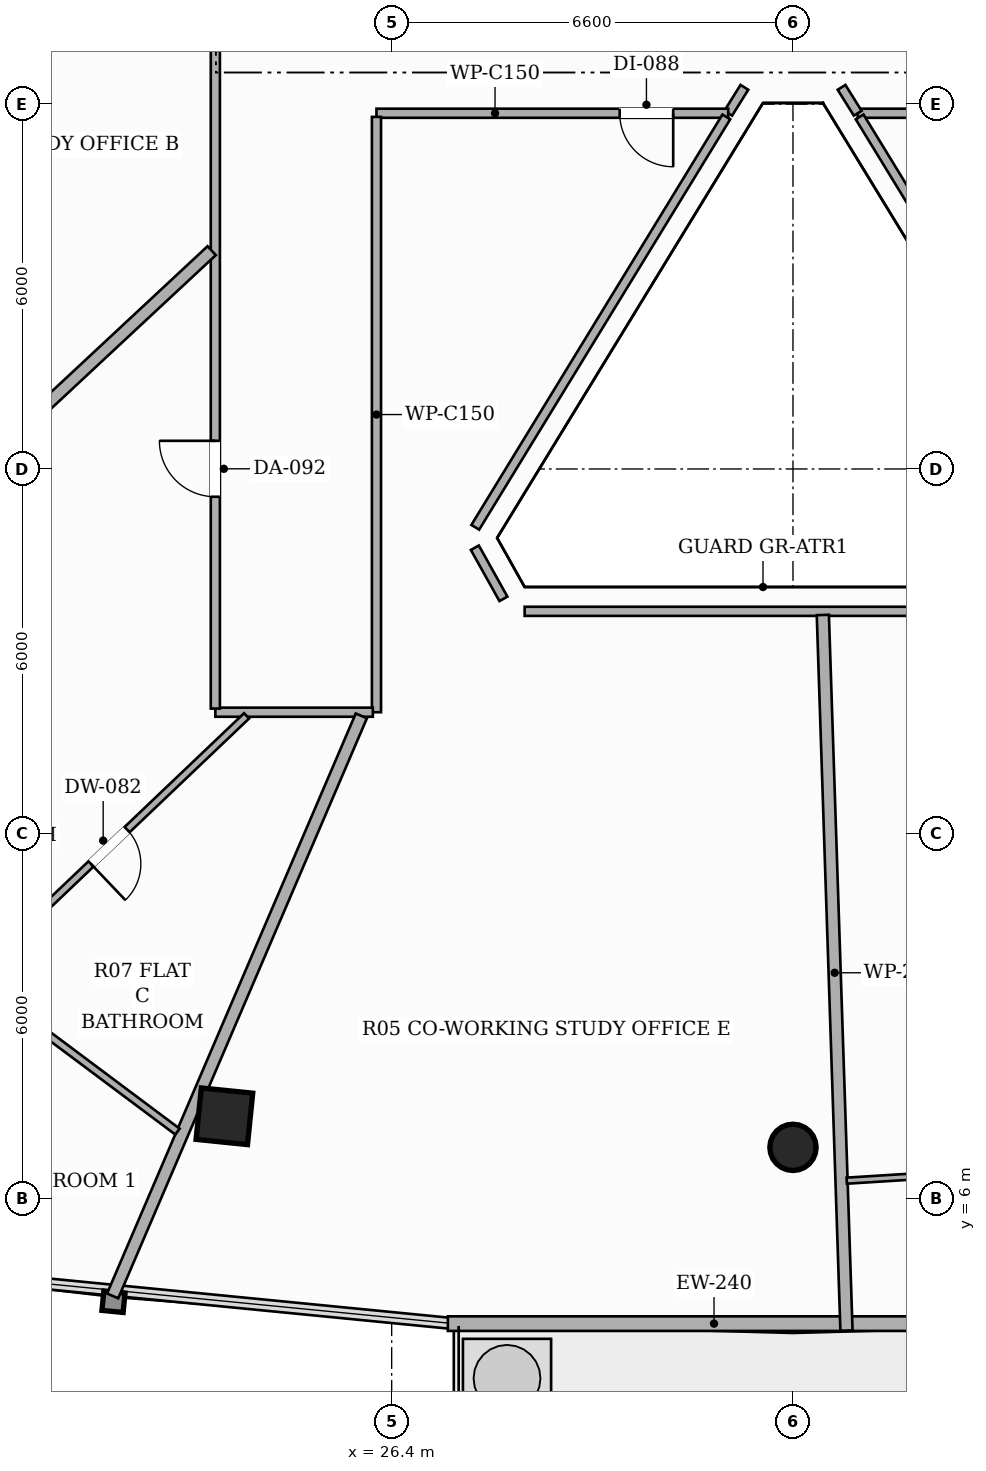
"""IFC4 building model, lengths in metres.
Left out: names, types, materials, properties, quantities, classifications, styles, units other than length and angle.
Written with IfcOpenShell. Run it as: python <this file> out.ifc"""

import sys

from ifc_helpers import new_model, si_unit, direction, frame, frame_2d, origin, origin_2d, place, context, subcontext, project, spatial, rectangle, hollow_rectangle, hollow_circle, extrude, element, fill, save


model = new_model("IFC4")
c1 = context("Model", 3, precision=1e-05, world=origin(), true_north=direction((0.0, 1.0)))
c2 = subcontext(c1, "Body", "Model", "MODEL_VIEW")
j1 = project(units=[si_unit("LENGTHUNIT", "METRE"), si_unit("PLANEANGLEUNIT", "RADIAN")], contexts=[c1])
p1 = place(None, origin())
s1 = spatial("IfcSite", under=j1, at=p1, CompositionType="ELEMENT")
p2 = place(p1, origin())
s2 = spatial("IfcBuilding", under=s1, at=p2, CompositionType="ELEMENT")
p3 = place(p2, frame((0.0, 0.0, 173.75)))
s3 = spatial("IfcBuildingStorey", under=s2, at=p3, CompositionType="ELEMENT", Elevation=173.75)
p4 = place(p3, frame((23.649, 7.355, 0.0), z_axis=(0.0, 0.0, 1.0), x_axis=(-0.994880708829, 0.101056297183, 0.0)))
e1 = element("IfcColumn", 1, at=p4, inside=s3, PredefinedType="COLUMN", context=c2, shape_type="SweptSolid", body=[
    extrude(hollow_rectangle(XDim=0.85, YDim=0.85, WallThickness=0.028, at=origin_2d()), origin(), (0.0, 0.0, 1.0), 3.3),
])
p5 = place(p3, frame((33.0, 6.844, 0.0), z_axis=(0.0, 0.0, 1.0), x_axis=(1.0, 0.0, 0.0)))
e2 = element("IfcColumn", 2, at=p5, inside=s3, PredefinedType="COLUMN", context=c2, shape_type="SweptSolid", body=[
    extrude(hollow_circle(Radius=0.381, WallThickness=0.022, at=origin_2d()), origin(), (0.0, 0.0, 1.0), 3.3),
])
p6 = place(p3, frame((20.826, 33.811, 0.0), z_axis=(0.0, 0.0, 1.0), x_axis=(-0.514332213488, -0.857591029669, 0.0)))
e3 = element("IfcWall", 3, at=p6, inside=s3, PredefinedType="SOLIDWALL", context=c2, shape_type="SweptSolid", body=[
    extrude(rectangle(XDim=10.977, YDim=0.24, at=frame_2d((5.489, 0.0))), origin(), (0.0, 0.0, 1.0), 2.624),
])
p7 = place(p6, frame((8.48, 0.0, 0.0)))
e4 = element("IfcOpeningElement", 4, at=p7, cuts=e3, PredefinedType="OPENING", context=c2, shape_type="SweptSolid", body=[
    extrude(rectangle(XDim=1.8, YDim=2.2, at=frame_2d((0.9, 1.1))), frame((0.0, 0.13, 0.0), z_axis=(0.0, -1.0, 0.0), x_axis=(1.0, 0.0, 0.0)), (0.0, 0.0, 1.0), 0.26),
])
p8 = place(p3, frame((27.324, 3.945, 0.0), z_axis=(0.0, 0.0, 1.0), x_axis=(1.0, 0.0, 0.0)))
e5 = element("IfcWall", 5, at=p8, inside=s3, PredefinedType="SOLIDWALL", context=c2, shape_type="SweptSolid", body=[
    extrude(rectangle(XDim=11.352, YDim=0.24, at=frame_2d((5.676, 0.0))), origin(), (0.0, 0.0, 1.0), 2.624),
])
p9 = place(p8, frame((8.855, 0.0, 0.0)))
e6 = element("IfcOpeningElement", 6, at=p9, cuts=e5, PredefinedType="OPENING", context=c2, shape_type="SweptSolid", body=[
    extrude(rectangle(XDim=1.8, YDim=2.2, at=frame_2d((0.9, 1.1))), frame((0.0, 0.13, 0.0), z_axis=(0.0, -1.0, 0.0), x_axis=(1.0, 0.0, 0.0)), (0.0, 0.0, 1.0), 0.26),
])
p10 = place(p3, frame((32.201, 24.276, 0.0), z_axis=(0.0, 0.0, 1.0), x_axis=(-0.529649150849, -0.84821682193, 0.0)))
e7 = element("IfcWall", 7, at=p10, inside=s3, PredefinedType="PARTITIONING", context=c2, shape_type="SweptSolid", body=[
    extrude(rectangle(XDim=0.502, YDim=0.15, at=frame_2d((0.251, 0.0))), origin(), (0.0, 0.0, 1.0), 3.06),
])
p11 = place(p3, frame((31.935, 23.85, 0.0), z_axis=(0.0, 0.0, 1.0), x_axis=(-1.0, 0.0, 0.0)))
e8 = element("IfcWall", 8, at=p11, inside=s3, PredefinedType="PARTITIONING", context=c2, shape_type="SweptSolid", body=[
    extrude(rectangle(XDim=5.785, YDim=0.15, at=frame_2d((2.893, 0.0))), origin(), (0.0, 0.0, 1.0), 2.721),
])
p12 = place(p11, frame((0.905, 0.0, 0.0)))
e9 = element("IfcOpeningElement", 9, at=p12, cuts=e8, PredefinedType="OPENING", context=c2, shape_type="SweptSolid", body=[
    extrude(rectangle(XDim=0.88, YDim=2.1, at=frame_2d((0.44, 1.05))), frame((0.0, 0.085, 0.0), z_axis=(0.0, -1.0, 0.0), x_axis=(1.0, 0.0, 0.0)), (0.0, 0.0, 1.0), 0.17),
])
p13 = place(p3, frame((26.15, 23.79, 0.0), z_axis=(0.0, 0.0, 1.0), x_axis=(0.0, -1.0, 0.0)))
e10 = element("IfcWall", 10, at=p13, inside=s3, PredefinedType="PARTITIONING", context=c2, shape_type="SweptSolid", body=[
    extrude(rectangle(XDim=9.79, YDim=0.15, at=frame_2d((4.895, 0.0))), origin(), (0.0, 0.0, 1.0), 2.721),
])
p14 = place(p3, frame((26.09, 14.0, 0.0), z_axis=(0.0, 0.0, 1.0), x_axis=(-1.0, 0.0, 0.0)))
e11 = element("IfcWall", 11, at=p14, inside=s3, PredefinedType="PARTITIONING", context=c2, shape_type="SweptSolid", body=[
    extrude(rectangle(XDim=2.59, YDim=0.15, at=frame_2d((1.295, 0.0))), origin(), (0.0, 0.0, 1.0), 2.721),
])
p15 = place(p3, frame((23.5, 14.06, 0.0), z_axis=(0.0, 0.0, 1.0), x_axis=(0.0, 1.0, 0.0)))
e12 = element("IfcWall", 12, at=p15, inside=s3, PredefinedType="PARTITIONING", context=c2, shape_type="SweptSolid", body=[
    extrude(rectangle(XDim=23.457, YDim=0.15, at=frame_2d((11.729, 0.0))), origin(), (0.0, 0.0, 1.0), 2.413),
])
p16 = place(p15, frame((14.586, 0.0, 0.0)))
e13 = element("IfcOpeningElement", 13, at=p16, cuts=e12, PredefinedType="OPENING", context=c2, shape_type="SweptSolid", body=[
    extrude(rectangle(XDim=0.88, YDim=2.1, at=frame_2d((0.44, 1.05))), frame((0.0, 0.085, 0.0), z_axis=(0.0, -1.0, 0.0), x_axis=(1.0, 0.0, 0.0)), (0.0, 0.0, 1.0), 0.17),
])
p17 = place(p15, frame((3.483, 0.0, 0.0)))
e14 = element("IfcOpeningElement", 14, at=p17, cuts=e12, PredefinedType="OPENING", context=c2, shape_type="SweptSolid", body=[
    extrude(rectangle(XDim=0.92, YDim=2.15, at=frame_2d((0.46, 1.075))), frame((0.0, 0.085, 0.0), z_axis=(0.0, -1.0, 0.0), x_axis=(1.0, 0.0, 0.0)), (0.0, 0.0, 1.0), 0.17),
])
p18 = place(p3, frame((42.29, 23.85, 0.0), z_axis=(0.0, 0.0, 1.0), x_axis=(-1.0, 0.0, 0.0)))
e15 = element("IfcWall", 15, at=p18, inside=s3, PredefinedType="PARTITIONING", context=c2, shape_type="SweptSolid", body=[
    extrude(rectangle(XDim=8.225, YDim=0.15, at=frame_2d((4.113, 0.0))), origin(), (0.0, 0.0, 1.0), 2.492),
])
p19 = place(p18, frame((5.493, 0.0, 0.0)))
e16 = element("IfcOpeningElement", 16, at=p19, cuts=e15, PredefinedType="OPENING", context=c2, shape_type="SweptSolid", body=[
    extrude(rectangle(XDim=0.92, YDim=2.15, at=frame_2d((0.46, 1.075))), frame((0.0, 0.085, 0.0), z_axis=(0.0, -1.0, 0.0), x_axis=(1.0, 0.0, 0.0)), (0.0, 0.0, 1.0), 0.17),
])
p20 = place(p18, frame((2.43, 0.0, 0.0)))
e17 = element("IfcOpeningElement", 17, at=p20, cuts=e15, PredefinedType="OPENING", context=c2, shape_type="SweptSolid", body=[
    extrude(rectangle(XDim=0.82, YDim=2.1, at=frame_2d((0.41, 1.05))), frame((0.0, 0.085, 0.0), z_axis=(0.0, -1.0, 0.0), x_axis=(1.0, 0.0, 0.0)), (0.0, 0.0, 1.0), 0.17),
])
p21 = place(p18, frame((0.14, 0.0, 0.0)))
e18 = element("IfcOpeningElement", 18, at=p21, cuts=e15, PredefinedType="OPENING", context=c2, shape_type="SweptSolid", body=[
    extrude(rectangle(XDim=0.88, YDim=2.1, at=frame_2d((0.44, 1.05))), frame((0.0, 0.085, 0.0), z_axis=(0.0, -1.0, 0.0), x_axis=(1.0, 0.0, 0.0)), (0.0, 0.0, 1.0), 0.17),
])
p22 = place(p3, frame((34.065, 23.85, 0.0), z_axis=(0.0, 0.0, 1.0), x_axis=(-0.529649150849, 0.84821682193, 0.0)))
e19 = element("IfcWall", 19, at=p22, inside=s3, PredefinedType="PARTITIONING", context=c2, shape_type="SweptSolid", body=[
    extrude(rectangle(XDim=0.502, YDim=0.15, at=frame_2d((0.251, 0.0))), origin(), (0.0, 0.0, 1.0), 3.06),
])
p23 = place(p3, frame((34.096, 23.79, 0.0), z_axis=(0.0, 0.0, 1.0), x_axis=(0.521886794995, -0.853014755564, 0.0)))
e20 = element("IfcWall", 20, at=p23, inside=s3, PredefinedType="PARTITIONING", context=c2, shape_type="SweptSolid", body=[
    extrude(rectangle(XDim=7.912, YDim=0.15, at=frame_2d((3.956, 0.0))), origin(), (0.0, 0.0, 1.0), 2.721),
])
p24 = place(p3, frame((37.413, 15.659, 0.0), z_axis=(0.0, 0.0, 1.0), x_axis=(-1.0, 0.0, 0.0)))
e21 = element("IfcWall", 21, at=p24, inside=s3, PredefinedType="PARTITIONING", context=c2, shape_type="SweptSolid", body=[
    extrude(rectangle(XDim=8.826, YDim=0.15, at=frame_2d((4.413, 0.0))), origin(), (0.0, 0.0, 1.0), 2.721),
])
p25 = place(p3, frame((28.238, 15.864, 0.0), z_axis=(0.0, 0.0, 1.0), x_axis=(-0.48779296069, 0.872959350429, 0.0)))
e22 = element("IfcWall", 22, at=p25, inside=s3, PredefinedType="PARTITIONING", context=c2, shape_type="SweptSolid", body=[
    extrude(rectangle(XDim=0.963, YDim=0.15, at=frame_2d((0.482, 0.0))), origin(), (0.0, 0.0, 1.0), 3.06),
])
p26 = place(p3, frame((27.775, 17.041, 0.0), z_axis=(0.0, 0.0, 1.0), x_axis=(0.521886794995, 0.853014755564, 0.0)))
e23 = element("IfcWall", 23, at=p26, inside=s3, PredefinedType="PARTITIONING", context=c2, shape_type="SweptSolid", body=[
    extrude(rectangle(XDim=7.912, YDim=0.15, at=frame_2d((3.956, 0.0))), origin(), (0.0, 0.0, 1.0), 2.721),
])
p27 = place(p3, frame((33.88, 3.831, 0.0), z_axis=(0.0, 0.0, 1.0), x_axis=(-0.033030388285, 0.999454347857, 0.0)))
e24 = element("IfcWall", 24, at=p27, inside=s3, PredefinedType="PARTITIONING", context=c2, shape_type="SweptSolid", body=[
    extrude(rectangle(XDim=11.774, YDim=0.2, at=frame_2d((5.887, 0.0))), origin(), (0.0, 0.0, 1.0), 2.413),
])
p28 = place(p3, frame((23.44, 21.59, 0.0), z_axis=(0.0, 0.0, 1.0), x_axis=(-0.731574776166, -0.681761209572, 0.0)))
e25 = element("IfcWall", 25, at=p28, inside=s3, PredefinedType="PARTITIONING", context=c2, shape_type="SweptSolid", body=[
    extrude(rectangle(XDim=20.433, YDim=0.2, at=frame_2d((10.216, 0.0))), origin(), (0.0, 0.0, 1.0), 2.413),
])
p29 = place(p3, frame((25.901, 13.94, 0.0), z_axis=(0.0, 0.0, 1.0), x_axis=(-0.394055564824, -0.919086618242, 0.0)))
e26 = element("IfcWall", 26, at=p29, inside=s3, PredefinedType="PARTITIONING", context=c2, shape_type="SweptSolid", body=[
    extrude(rectangle(XDim=10.379, YDim=0.2, at=frame_2d((5.189, 0.0))), origin(), (0.0, 0.0, 1.0), 2.413),
])
p30 = place(p3, frame((41.446, 6.77, 0.0), z_axis=(0.0, 0.0, 1.0), x_axis=(-0.998040272182, -0.062574875979, 0.0)))
e27 = element("IfcWall", 27, at=p30, inside=s3, PredefinedType="PARTITIONING", context=c2, shape_type="SweptSolid", body=[
    extrude(rectangle(XDim=7.577, YDim=0.1, at=frame_2d((3.789, 0.0))), origin(), (0.0, 0.0, 1.0), 3.06),
])
p31 = place(p30, frame((3.378, 0.0, 0.0)))
e28 = element("IfcOpeningElement", 28, at=p31, cuts=e27, PredefinedType="OPENING", context=c2, shape_type="SweptSolid", body=[
    extrude(rectangle(XDim=0.82, YDim=2.1, at=frame_2d((0.41, 1.05))), frame((0.0, 0.06, 0.0), z_axis=(0.0, -1.0, 0.0), x_axis=(1.0, 0.0, 0.0)), (0.0, 0.0, 1.0), 0.12),
])
p32 = place(p3, frame((24.014, 13.94, 0.0), z_axis=(0.0, 0.0, 1.0), x_axis=(-0.724345202964, -0.68943747138, 0.0)))
e29 = element("IfcWall", 29, at=p32, inside=s3, PredefinedType="PARTITIONING", context=c2, shape_type="SweptSolid", body=[
    extrude(rectangle(XDim=6.246, YDim=0.12, at=frame_2d((3.123, 0.0))), origin(), (0.0, 0.0, 1.0), 2.721),
])
p33 = place(p32, frame((2.713, 0.0, 0.0)))
e30 = element("IfcOpeningElement", 30, at=p33, cuts=e29, PredefinedType="OPENING", context=c2, shape_type="SweptSolid", body=[
    extrude(rectangle(XDim=0.82, YDim=2.1, at=frame_2d((0.41, 1.05))), frame((0.0, 0.07, 0.0), z_axis=(0.0, -1.0, 0.0), x_axis=(1.0, 0.0, 0.0)), (0.0, 0.0, 1.0), 0.14),
])
p34 = place(p3, frame((22.877, 7.103, 0.0), z_axis=(0.0, 0.0, 1.0), x_axis=(-0.801045056039, 0.598604057951, 0.0)))
e31 = element("IfcWall", 31, at=p34, inside=s3, PredefinedType="PARTITIONING", context=c2, shape_type="SweptSolid", body=[
    extrude(rectangle(XDim=4.228, YDim=0.12, at=frame_2d((2.114, 0.0))), origin(), (0.0, 0.0, 1.0), 2.413),
])
p35 = place(p17, origin())
e32 = element("IfcDoor", 32, at=p35, inside=s3, OperationType="SINGLE_SWING_RIGHT", PredefinedType="DOOR", context=c2, shape_type="SweptSolid", body=[
    extrude(rectangle(XDim=0.92, YDim=2.15, at=frame_2d((0.46, 1.075))), frame((0.0, 0.025, 0.0), z_axis=(0.0, -1.0, 0.0), x_axis=(1.0, 0.0, 0.0)), (0.0, 0.0, 1.0), 0.05),
])
fill(e14, e32)
p36 = place(p33, origin())
e33 = element("IfcDoor", 33, at=p36, inside=s3, OperationType="SINGLE_SWING_RIGHT", PredefinedType="DOOR", context=c2, shape_type="SweptSolid", body=[
    extrude(rectangle(XDim=0.82, YDim=2.1, at=frame_2d((0.41, 1.05))), frame((0.0, 0.025, 0.0), z_axis=(0.0, -1.0, 0.0), x_axis=(1.0, 0.0, 0.0)), (0.0, 0.0, 1.0), 0.05),
])
fill(e30, e33)
p37 = place(p12, origin())
e34 = element("IfcDoor", 34, at=p37, inside=s3, OperationType="SINGLE_SWING_LEFT", PredefinedType="DOOR", context=c2, shape_type="SweptSolid", body=[
    extrude(rectangle(XDim=0.88, YDim=2.1, at=frame_2d((0.44, 1.05))), frame((0.0, 0.025, 0.0), z_axis=(0.0, -1.0, 0.0), x_axis=(1.0, 0.0, 0.0)), (0.0, 0.0, 1.0), 0.05),
])
fill(e9, e34)
save(model, sys.argv[1])
